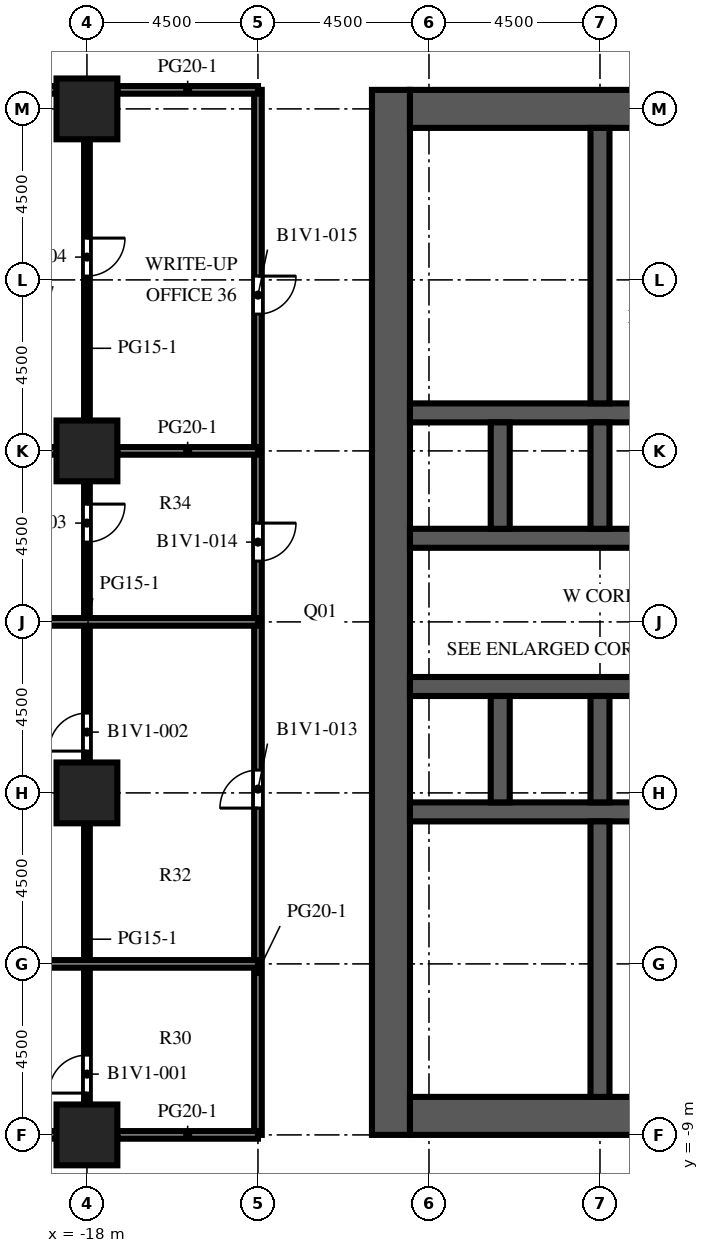
"""IFC4 building model, lengths in metres.
Left out: names, types, materials, properties, quantities, classifications, styles, units other than length and angle.
Written with IfcOpenShell. Run it as: python <this file> out.ifc"""

import sys

from ifc_helpers import new_model, si_unit, direction, frame, frame_2d, origin, origin_2d, place, context, subcontext, project, spatial, rectangle, extrude, element, fill, save


model = new_model("IFC4")
c1 = context("Model", 3, precision=1e-05, world=origin(), true_north=direction((0.0, 1.0)))
c2 = subcontext(c1, "Body", "Model", "MODEL_VIEW")
j1 = project(units=[si_unit("LENGTHUNIT", "METRE"), si_unit("PLANEANGLEUNIT", "RADIAN")], contexts=[c1])
p1 = place(None, origin())
s1 = spatial("IfcSite", under=j1, at=p1, CompositionType="ELEMENT")
p2 = place(p1, origin())
s2 = spatial("IfcBuilding", under=s1, at=p2, CompositionType="ELEMENT")
p3 = place(p2, frame((0.0, 0.0, 27.7)))
s3 = spatial("IfcBuildingStorey", under=s2, at=p3, CompositionType="ELEMENT", Elevation=27.7)
for number, where, z_axis, x_axis in (
    (1, (-18.0, -9.0, 0.0), (0.0, 0.0, 1.0), (1.0, 0.0, 0.0)),
    (2, (-18.0, 0.0, 0.0), (0.0, 0.0, 1.0), (1.0, 0.0, 0.0)),
    (3, (-18.0, 9.0, 0.0), (0.0, 0.0, 1.0), (1.0, 0.0, 0.0)),
    (4, (-18.0, 18.0, 0.0), (0.0, 0.0, 1.0), (1.0, 0.0, 0.0)),
):
    element("IfcColumn", number, at=place(p3, frame(where, z_axis=z_axis, x_axis=x_axis)), inside=s3, PredefinedType="COLUMN", context=c2, shape_type="SweptSolid", body=[
        extrude(rectangle(XDim=1.6, YDim=1.6, at=origin_2d()), origin(), (0.0, 0.0, 1.0), 4.1),
    ])
p4 = place(p3, frame((-10.0, -9.0, 0.0), z_axis=(0.0, 0.0, 1.0), x_axis=(0.0, 1.0, 0.0)))
e5 = element("IfcWall", 5, at=p4, inside=s3, PredefinedType="SHEAR", context=c2, shape_type="SweptSolid", body=[
    extrude(rectangle(XDim=27.5, YDim=1.0, at=frame_2d((13.75, 0.0))), origin(), (0.0, 0.0, 1.0), 4.1),
])
p5 = place(p4, frame((12.55, 0.0, 0.0)))
e6 = element("IfcOpeningElement", 6, at=p5, cuts=e5, PredefinedType="OPENING", context=c2, shape_type="SweptSolid", body=[
    extrude(rectangle(XDim=2.4, YDim=2.4, at=frame_2d((1.2, 1.2))), frame((0.0, 0.51, 0.0), z_axis=(0.0, -1.0, 0.0), x_axis=(1.0, 0.0, 0.0)), (0.0, 0.0, 1.0), 1.02),
])
p6 = place(p4, frame((6.825, 0.0, 0.0)))
e7 = element("IfcOpeningElement", 7, at=p6, cuts=e5, PredefinedType="OPENING", context=c2, shape_type="SweptSolid", body=[
    extrude(rectangle(XDim=1.2, YDim=2.1, at=frame_2d((0.6, 1.05))), frame((0.0, 0.51, 0.0), z_axis=(0.0, -1.0, 0.0), x_axis=(1.0, 0.0, 0.0)), (0.0, 0.0, 1.0), 1.02),
])
p7 = place(p4, frame((19.475, 0.0, 0.0)))
e8 = element("IfcOpeningElement", 8, at=p7, cuts=e5, PredefinedType="OPENING", context=c2, shape_type="SweptSolid", body=[
    extrude(rectangle(XDim=1.2, YDim=2.1, at=frame_2d((0.6, 1.05))), frame((0.0, 0.51, 0.0), z_axis=(0.0, -1.0, 0.0), x_axis=(1.0, 0.0, 0.0)), (0.0, 0.0, 1.0), 1.02),
])
for number, where, z_axis, x_axis in (
    (9, (-9.5, -8.5, 0.0), (0.0, 0.0, 1.0), (1.0, 0.0, 0.0)),
    (10, (-9.5, 18.0, 0.0), (0.0, 0.0, 1.0), (1.0, 0.0, 0.0)),
):
    element("IfcWall", number, at=place(p3, frame(where, z_axis=z_axis, x_axis=x_axis)), inside=s3, PredefinedType="SHEAR", context=c2, shape_type="SweptSolid", body=[
        extrude(rectangle(XDim=10.0, YDim=1.0, at=frame_2d((5.0, 0.0))), origin(), (0.0, 0.0, 1.0), 4.1),
    ])
p8 = place(p3, frame((-9.5, -0.5, 0.0), z_axis=(0.0, 0.0, 1.0), x_axis=(1.0, 0.0, 0.0)))
e11 = element("IfcWall", 11, at=p8, inside=s3, PredefinedType="SHEAR", context=c2, shape_type="SweptSolid", body=[
    extrude(rectangle(XDim=10.0, YDim=0.5, at=frame_2d((5.0, 0.0))), origin(), (0.0, 0.0, 1.0), 4.1),
])
p9 = place(p3, frame((-9.5, 2.8, 0.0), z_axis=(0.0, 0.0, 1.0), x_axis=(1.0, 0.0, 0.0)))
e12 = element("IfcWall", 12, at=p9, inside=s3, PredefinedType="SHEAR", context=c2, shape_type="SweptSolid", body=[
    extrude(rectangle(XDim=10.0, YDim=0.5, at=frame_2d((5.0, 0.0))), origin(), (0.0, 0.0, 1.0), 4.1),
])
p10 = place(p9, frame((0.512, 0.0, 0.0)))
e13 = element("IfcOpeningElement", 13, at=p10, cuts=e12, PredefinedType="OPENING", context=c2, shape_type="SweptSolid", body=[
    extrude(rectangle(XDim=1.1, YDim=2.1, at=frame_2d((0.55, 1.05))), frame((0.0, 0.26, 0.0), z_axis=(0.0, -1.0, 0.0), x_axis=(1.0, 0.0, 0.0)), (0.0, 0.0, 1.0), 0.52),
])
p11 = place(p9, frame((3.137, 0.0, 0.0)))
e14 = element("IfcOpeningElement", 14, at=p11, cuts=e12, PredefinedType="OPENING", context=c2, shape_type="SweptSolid", body=[
    extrude(rectangle(XDim=1.1, YDim=2.1, at=frame_2d((0.55, 1.05))), frame((0.0, 0.26, 0.0), z_axis=(0.0, -1.0, 0.0), x_axis=(1.0, 0.0, 0.0)), (0.0, 0.0, 1.0), 0.52),
])
p12 = place(p9, frame((8.387, 0.0, 0.0)))
e15 = element("IfcOpeningElement", 15, at=p12, cuts=e12, PredefinedType="OPENING", context=c2, shape_type="SweptSolid", body=[
    extrude(rectangle(XDim=1.1, YDim=2.1, at=frame_2d((0.55, 1.05))), frame((0.0, 0.26, 0.0), z_axis=(0.0, -1.0, 0.0), x_axis=(1.0, 0.0, 0.0)), (0.0, 0.0, 1.0), 0.52),
])
p13 = place(p3, frame((-9.5, 6.7, 0.0), z_axis=(0.0, 0.0, 1.0), x_axis=(1.0, 0.0, 0.0)))
e16 = element("IfcWall", 16, at=p13, inside=s3, PredefinedType="SHEAR", context=c2, shape_type="SweptSolid", body=[
    extrude(rectangle(XDim=10.0, YDim=0.5, at=frame_2d((5.0, 0.0))), origin(), (0.0, 0.0, 1.0), 4.1),
])
p14 = place(p13, frame((0.512, 0.0, 0.0)))
e17 = element("IfcOpeningElement", 17, at=p14, cuts=e16, PredefinedType="OPENING", context=c2, shape_type="SweptSolid", body=[
    extrude(rectangle(XDim=1.1, YDim=2.1, at=frame_2d((0.55, 1.05))), frame((0.0, 0.26, 0.0), z_axis=(0.0, -1.0, 0.0), x_axis=(1.0, 0.0, 0.0)), (0.0, 0.0, 1.0), 0.52),
])
p15 = place(p13, frame((3.188, 0.0, 0.0)))
e18 = element("IfcOpeningElement", 18, at=p15, cuts=e16, PredefinedType="OPENING", context=c2, shape_type="SweptSolid", body=[
    extrude(rectangle(XDim=1.0, YDim=2.1, at=frame_2d((0.5, 1.05))), frame((0.0, 0.26, 0.0), z_axis=(0.0, -1.0, 0.0), x_axis=(1.0, 0.0, 0.0)), (0.0, 0.0, 1.0), 0.52),
])
p16 = place(p13, frame((5.812, 0.0, 0.0)))
e19 = element("IfcOpeningElement", 19, at=p16, cuts=e16, PredefinedType="OPENING", context=c2, shape_type="SweptSolid", body=[
    extrude(rectangle(XDim=1.0, YDim=2.1, at=frame_2d((0.5, 1.05))), frame((0.0, 0.26, 0.0), z_axis=(0.0, -1.0, 0.0), x_axis=(1.0, 0.0, 0.0)), (0.0, 0.0, 1.0), 0.52),
])
p17 = place(p13, frame((8.438, 0.0, 0.0)))
e20 = element("IfcOpeningElement", 20, at=p17, cuts=e16, PredefinedType="OPENING", context=c2, shape_type="SweptSolid", body=[
    extrude(rectangle(XDim=1.0, YDim=2.1, at=frame_2d((0.5, 1.05))), frame((0.0, 0.26, 0.0), z_axis=(0.0, -1.0, 0.0), x_axis=(1.0, 0.0, 0.0)), (0.0, 0.0, 1.0), 0.52),
])
p18 = place(p3, frame((-9.5, 10.0, 0.0), z_axis=(0.0, 0.0, 1.0), x_axis=(1.0, 0.0, 0.0)))
e21 = element("IfcWall", 21, at=p18, inside=s3, PredefinedType="SHEAR", context=c2, shape_type="SweptSolid", body=[
    extrude(rectangle(XDim=10.0, YDim=0.5, at=frame_2d((5.0, 0.0))), origin(), (0.0, 0.0, 1.0), 4.1),
])
for number, where, z_axis, x_axis in (
    (22, (-7.125, -0.25, 0.0), (0.0, 0.0, 1.0), (0.0, 1.0, 0.0)),
    (23, (-7.125, 6.95, 0.0), (0.0, 0.0, 1.0), (0.0, 1.0, 0.0)),
    (24, (-4.5, -0.25, 0.0), (0.0, 0.0, 1.0), (0.0, 1.0, 0.0)),
    (25, (-4.5, 6.95, 0.0), (0.0, 0.0, 1.0), (0.0, 1.0, 0.0)),
):
    element("IfcWall", number, at=place(p3, frame(where, z_axis=z_axis, x_axis=x_axis)), inside=s3, PredefinedType="SHEAR", context=c2, shape_type="SweptSolid", body=[
        extrude(rectangle(XDim=2.8, YDim=0.5, at=frame_2d((1.4, 0.0))), origin(), (0.0, 0.0, 1.0), 4.1),
    ])
for number, where, z_axis, x_axis in (
    (26, (-4.5, -8.0, 0.0), (0.0, 0.0, 1.0), (0.0, 1.0, 0.0)),
    (27, (-4.5, 10.25, 0.0), (0.0, 0.0, 1.0), (0.0, 1.0, 0.0)),
):
    element("IfcWall", number, at=place(p3, frame(where, z_axis=z_axis, x_axis=x_axis)), inside=s3, PredefinedType="SHEAR", context=c2, shape_type="SweptSolid", body=[
        extrude(rectangle(XDim=7.25, YDim=0.5, at=frame_2d((3.625, 0.0))), origin(), (0.0, 0.0, 1.0), 4.1),
    ])
p19 = place(p3, frame((-4.25, -5.245, 0.0), z_axis=(0.0, 0.0, 1.0), x_axis=(1.0, 0.0, 0.0)))
e28 = element("IfcWall", 28, at=p19, inside=s3, PredefinedType="PARTITIONING", context=c2, shape_type="SweptSolid", body=[
    extrude(rectangle(XDim=4.75, YDim=0.1, at=frame_2d((2.375, 0.0))), origin(), (0.0, 0.0, 1.0), 3.65),
])
p20 = place(p19, frame((1.875, 0.0, 0.0)))
e29 = element("IfcOpeningElement", 29, at=p20, cuts=e28, PredefinedType="OPENING", context=c2, shape_type="SweptSolid", body=[
    extrude(rectangle(XDim=1.0, YDim=2.1, at=frame_2d((0.5, 1.05))), frame((0.0, 0.06, 0.0), z_axis=(0.0, -1.0, 0.0), x_axis=(1.0, 0.0, 0.0)), (0.0, 0.0, 1.0), 0.12),
])
p21 = place(p3, frame((-4.25, -3.94, 0.0), z_axis=(0.0, 0.0, 1.0), x_axis=(1.0, 0.0, 0.0)))
e30 = element("IfcWall", 30, at=p21, inside=s3, PredefinedType="PARTITIONING", context=c2, shape_type="SweptSolid", body=[
    extrude(rectangle(XDim=1.805, YDim=0.1, at=frame_2d((0.902, 0.0))), origin(), (0.0, 0.0, 1.0), 3.65),
])
p22 = place(p21, frame((0.403, 0.0, 0.0)))
e31 = element("IfcOpeningElement", 31, at=p22, cuts=e30, PredefinedType="OPENING", context=c2, shape_type="SweptSolid", body=[
    extrude(rectangle(XDim=1.0, YDim=2.1, at=frame_2d((0.5, 1.05))), frame((0.0, 0.06, 0.0), z_axis=(0.0, -1.0, 0.0), x_axis=(1.0, 0.0, 0.0)), (0.0, 0.0, 1.0), 0.12),
])
for number, where, z_axis, x_axis in (
    (32, (-4.25, 12.425, 0.0), (0.0, 0.0, 1.0), (1.0, 0.0, 0.0)),
    (33, (-4.25, 14.962, 0.0), (0.0, 0.0, 1.0), (1.0, 0.0, 0.0)),
):
    element("IfcWall", number, at=place(p3, frame(where, z_axis=z_axis, x_axis=x_axis)), inside=s3, PredefinedType="PARTITIONING", context=c2, shape_type="SweptSolid", body=[
        extrude(rectangle(XDim=3.45, YDim=0.1, at=frame_2d((1.725, 0.0))), origin(), (0.0, 0.0, 1.0), 3.65),
    ])
p23 = place(p3, frame((-18.0, -0.8, 0.0), z_axis=(0.0, 0.0, 1.0), x_axis=(0.0, -1.0, 0.0)))
e34 = element("IfcWall", 34, at=p23, inside=s3, PredefinedType="PARTITIONING", context=c2, shape_type="SweptSolid", body=[
    extrude(rectangle(XDim=7.4, YDim=0.15, at=frame_2d((3.7, 0.0))), origin(), (0.0, 0.0, 1.0), 3.65),
])
p24 = place(p23, frame((6.1, 0.0, 0.0)))
e35 = element("IfcOpeningElement", 35, at=p24, cuts=e34, PredefinedType="OPENING", context=c2, shape_type="SweptSolid", body=[
    extrude(rectangle(XDim=1.0, YDim=2.1, at=frame_2d((0.5, 1.05))), frame((0.0, 0.085, 0.0), z_axis=(0.0, -1.0, 0.0), x_axis=(1.0, 0.0, 0.0)), (0.0, 0.0, 1.0), 0.17),
])
p25 = place(p3, frame((-18.0, 0.8, 0.0), z_axis=(0.0, 0.0, 1.0), x_axis=(0.0, 1.0, 0.0)))
e36 = element("IfcWall", 36, at=p25, inside=s3, PredefinedType="PARTITIONING", context=c2, shape_type="SweptSolid", body=[
    extrude(rectangle(XDim=7.4, YDim=0.15, at=frame_2d((3.7, 0.0))), origin(), (0.0, 0.0, 1.0), 3.65),
])
p26 = place(p25, frame((0.3, 0.0, 0.0)))
e37 = element("IfcOpeningElement", 37, at=p26, cuts=e36, PredefinedType="OPENING", context=c2, shape_type="SweptSolid", body=[
    extrude(rectangle(XDim=1.0, YDim=2.1, at=frame_2d((0.5, 1.05))), frame((0.0, 0.085, 0.0), z_axis=(0.0, -1.0, 0.0), x_axis=(1.0, 0.0, 0.0)), (0.0, 0.0, 1.0), 0.17),
])
p27 = place(p25, frame((5.8, 0.0, 0.0)))
e38 = element("IfcOpeningElement", 38, at=p27, cuts=e36, PredefinedType="OPENING", context=c2, shape_type="SweptSolid", body=[
    extrude(rectangle(XDim=1.0, YDim=2.1, at=frame_2d((0.5, 1.05))), frame((0.0, 0.085, 0.0), z_axis=(0.0, -1.0, 0.0), x_axis=(1.0, 0.0, 0.0)), (0.0, 0.0, 1.0), 0.17),
])
p28 = place(p3, frame((-18.0, 9.8, 0.0), z_axis=(0.0, 0.0, 1.0), x_axis=(0.0, 1.0, 0.0)))
e39 = element("IfcWall", 39, at=p28, inside=s3, PredefinedType="PARTITIONING", context=c2, shape_type="SweptSolid", body=[
    extrude(rectangle(XDim=7.4, YDim=0.15, at=frame_2d((3.7, 0.0))), origin(), (0.0, 0.0, 1.0), 3.65),
])
p29 = place(p28, frame((3.8, 0.0, 0.0)))
e40 = element("IfcOpeningElement", 40, at=p29, cuts=e39, PredefinedType="OPENING", context=c2, shape_type="SweptSolid", body=[
    extrude(rectangle(XDim=1.0, YDim=2.1, at=frame_2d((0.5, 1.05))), frame((0.0, 0.085, 0.0), z_axis=(0.0, -1.0, 0.0), x_axis=(1.0, 0.0, 0.0)), (0.0, 0.0, 1.0), 0.17),
])
p30 = place(p3, frame((-13.5, -9.0, 0.0), z_axis=(0.0, 0.0, 1.0), x_axis=(0.0, 1.0, 0.0)))
e41 = element("IfcWall", 41, at=p30, inside=s3, PredefinedType="PARTITIONING", context=c2, shape_type="SweptSolid", body=[
    extrude(rectangle(XDim=27.5, YDim=0.2, at=frame_2d((13.75, 0.0))), origin(), (0.0, 0.0, 1.0), 3.65),
])
p31 = place(p30, frame((8.6, 0.0, 0.0)))
e42 = element("IfcOpeningElement", 42, at=p31, cuts=e41, PredefinedType="OPENING", context=c2, shape_type="SweptSolid", body=[
    extrude(rectangle(XDim=1.0, YDim=2.1, at=frame_2d((0.5, 1.05))), frame((0.0, 0.11, 0.0), z_axis=(0.0, -1.0, 0.0), x_axis=(1.0, 0.0, 0.0)), (0.0, 0.0, 1.0), 0.22),
])
p32 = place(p30, frame((15.1, 0.0, 0.0)))
e43 = element("IfcOpeningElement", 43, at=p32, cuts=e41, PredefinedType="OPENING", context=c2, shape_type="SweptSolid", body=[
    extrude(rectangle(XDim=1.0, YDim=2.1, at=frame_2d((0.5, 1.05))), frame((0.0, 0.11, 0.0), z_axis=(0.0, -1.0, 0.0), x_axis=(1.0, 0.0, 0.0)), (0.0, 0.0, 1.0), 0.22),
])
p33 = place(p30, frame((21.6, 0.0, 0.0)))
e44 = element("IfcOpeningElement", 44, at=p33, cuts=e41, PredefinedType="OPENING", context=c2, shape_type="SweptSolid", body=[
    extrude(rectangle(XDim=1.0, YDim=2.1, at=frame_2d((0.5, 1.05))), frame((0.0, 0.11, 0.0), z_axis=(0.0, -1.0, 0.0), x_axis=(1.0, 0.0, 0.0)), (0.0, 0.0, 1.0), 0.22),
])
p34 = place(p3, frame((-26.3, -9.0, 0.0), z_axis=(0.0, 0.0, 1.0), x_axis=(1.0, 0.0, 0.0)))
e45 = element("IfcWall", 45, at=p34, inside=s3, PredefinedType="PARTITIONING", context=c2, shape_type="SweptSolid", body=[
    extrude(rectangle(XDim=7.5, YDim=0.2, at=frame_2d((3.75, 0.0))), origin(), (0.0, 0.0, 1.0), 3.65),
])
p35 = place(p34, frame((2.9, 0.0, 0.0)))
e46 = element("IfcOpeningElement", 46, at=p35, cuts=e45, PredefinedType="OPENING", context=c2, shape_type="SweptSolid", body=[
    extrude(rectangle(XDim=1.0, YDim=2.1, at=frame_2d((0.5, 1.05))), frame((0.0, 0.11, 0.0), z_axis=(0.0, -1.0, 0.0), x_axis=(1.0, 0.0, 0.0)), (0.0, 0.0, 1.0), 0.22),
])
p36 = place(p3, frame((-17.2, -9.0, 0.0), z_axis=(0.0, 0.0, 1.0), x_axis=(1.0, 0.0, 0.0)))
e47 = element("IfcWall", 47, at=p36, inside=s3, PredefinedType="PARTITIONING", context=c2, shape_type="SweptSolid", body=[
    extrude(rectangle(XDim=3.7, YDim=0.2, at=frame_2d((1.85, 0.0))), origin(), (0.0, 0.0, 1.0), 3.65),
])
for number, where, z_axis, x_axis in (
    (48, (-26.3, -4.5, 0.0), (0.0, 0.0, 1.0), (1.0, 0.0, 0.0)),
    (49, (-26.3, 4.5, 0.0), (0.0, 0.0, 1.0), (1.0, 0.0, 0.0)),
):
    element("IfcWall", number, at=place(p3, frame(where, z_axis=z_axis, x_axis=x_axis)), inside=s3, PredefinedType="PARTITIONING", context=c2, shape_type="SweptSolid", body=[
        extrude(rectangle(XDim=12.8, YDim=0.2, at=frame_2d((6.4, 0.0))), origin(), (0.0, 0.0, 1.0), 3.65),
    ])
p37 = place(p3, frame((-26.3, 9.0, 0.0), z_axis=(0.0, 0.0, 1.0), x_axis=(1.0, 0.0, 0.0)))
e50 = element("IfcWall", 50, at=p37, inside=s3, PredefinedType="PARTITIONING", context=c2, shape_type="SweptSolid", body=[
    extrude(rectangle(XDim=7.5, YDim=0.2, at=frame_2d((3.75, 0.0))), origin(), (0.0, 0.0, 1.0), 3.65),
])
p38 = place(p3, frame((-17.2, 9.0, 0.0), z_axis=(0.0, 0.0, 1.0), x_axis=(1.0, 0.0, 0.0)))
e51 = element("IfcWall", 51, at=p38, inside=s3, PredefinedType="PARTITIONING", context=c2, shape_type="SweptSolid", body=[
    extrude(rectangle(XDim=3.7, YDim=0.2, at=frame_2d((1.85, 0.0))), origin(), (0.0, 0.0, 1.0), 3.65),
])
p39 = place(p3, frame((-26.3, 18.5, 0.0), z_axis=(0.0, 0.0, 1.0), x_axis=(1.0, 0.0, 0.0)))
e52 = element("IfcWall", 52, at=p39, inside=s3, PredefinedType="PARTITIONING", context=c2, shape_type="SweptSolid", body=[
    extrude(rectangle(XDim=7.5, YDim=0.2, at=frame_2d((3.75, 0.0))), origin(), (0.0, 0.0, 1.0), 3.65),
])
p40 = place(p3, frame((-17.2, 18.5, 0.0), z_axis=(0.0, 0.0, 1.0), x_axis=(1.0, 0.0, 0.0)))
e53 = element("IfcWall", 53, at=p40, inside=s3, PredefinedType="PARTITIONING", context=c2, shape_type="SweptSolid", body=[
    extrude(rectangle(XDim=3.7, YDim=0.2, at=frame_2d((1.85, 0.0))), origin(), (0.0, 0.0, 1.0), 3.65),
])
p41 = place(p10, origin())
e54 = element("IfcDoor", 54, at=p41, inside=s3, OperationType="DOUBLE_DOOR_SLIDING", PredefinedType="DOOR", context=c2, shape_type="SweptSolid", body=[
    extrude(rectangle(XDim=1.1, YDim=2.1, at=frame_2d((0.55, 1.05))), frame((0.0, 0.025, 0.0), z_axis=(0.0, -1.0, 0.0), x_axis=(1.0, 0.0, 0.0)), (0.0, 0.0, 1.0), 0.05),
])
fill(e13, e54)
p42 = place(p11, origin())
e55 = element("IfcDoor", 55, at=p42, inside=s3, OperationType="DOUBLE_DOOR_SLIDING", PredefinedType="DOOR", context=c2, shape_type="SweptSolid", body=[
    extrude(rectangle(XDim=1.1, YDim=2.1, at=frame_2d((0.55, 1.05))), frame((0.0, 0.025, 0.0), z_axis=(0.0, -1.0, 0.0), x_axis=(1.0, 0.0, 0.0)), (0.0, 0.0, 1.0), 0.05),
])
fill(e14, e55)
p43 = place(p14, origin())
e56 = element("IfcDoor", 56, at=p43, inside=s3, OperationType="DOUBLE_DOOR_SLIDING", PredefinedType="DOOR", context=c2, shape_type="SweptSolid", body=[
    extrude(rectangle(XDim=1.1, YDim=2.1, at=frame_2d((0.55, 1.05))), frame((0.0, 0.025, 0.0), z_axis=(0.0, -1.0, 0.0), x_axis=(1.0, 0.0, 0.0)), (0.0, 0.0, 1.0), 0.05),
])
fill(e17, e56)
p44 = place(p5, origin())
e57 = element("IfcDoor", 57, at=p44, inside=s3, OperationType="DOUBLE_DOOR_DOUBLE_SWING", PredefinedType="DOOR", context=c2, shape_type="SweptSolid", body=[
    extrude(rectangle(XDim=2.4, YDim=2.4, at=frame_2d((1.2, 1.2))), frame((0.0, 0.025, 0.0), z_axis=(0.0, -1.0, 0.0), x_axis=(1.0, 0.0, 0.0)), (0.0, 0.0, 1.0), 0.05),
])
fill(e6, e57)
p45 = place(p6, origin())
e58 = element("IfcDoor", 58, at=p45, inside=s3, OperationType="SINGLE_SWING_LEFT", PredefinedType="DOOR", context=c2, shape_type="SweptSolid", body=[
    extrude(rectangle(XDim=1.2, YDim=2.1, at=frame_2d((0.6, 1.05))), frame((0.0, 0.025, 0.0), z_axis=(0.0, -1.0, 0.0), x_axis=(1.0, 0.0, 0.0)), (0.0, 0.0, 1.0), 0.05),
])
fill(e7, e58)
p46 = place(p7, origin())
e59 = element("IfcDoor", 59, at=p46, inside=s3, OperationType="SINGLE_SWING_LEFT", PredefinedType="DOOR", context=c2, shape_type="SweptSolid", body=[
    extrude(rectangle(XDim=1.2, YDim=2.1, at=frame_2d((0.6, 1.05))), frame((0.0, 0.025, 0.0), z_axis=(0.0, -1.0, 0.0), x_axis=(1.0, 0.0, 0.0)), (0.0, 0.0, 1.0), 0.05),
])
fill(e8, e59)
p47 = place(p15, origin())
e60 = element("IfcDoor", 60, at=p47, inside=s3, OperationType="SINGLE_SWING_RIGHT", PredefinedType="DOOR", context=c2, shape_type="SweptSolid", body=[
    extrude(rectangle(XDim=1.0, YDim=2.1, at=frame_2d((0.5, 1.05))), frame((0.0, 0.025, 0.0), z_axis=(0.0, -1.0, 0.0), x_axis=(1.0, 0.0, 0.0)), (0.0, 0.0, 1.0), 0.05),
])
fill(e18, e60)
p48 = place(p22, origin())
e61 = element("IfcDoor", 61, at=p48, inside=s3, OperationType="SINGLE_SWING_RIGHT", PredefinedType="DOOR", context=c2, shape_type="SweptSolid", body=[
    extrude(rectangle(XDim=1.0, YDim=2.1, at=frame_2d((0.5, 1.05))), frame((0.0, 0.025, 0.0), z_axis=(0.0, -1.0, 0.0), x_axis=(1.0, 0.0, 0.0)), (0.0, 0.0, 1.0), 0.05),
])
fill(e31, e61)
p49 = place(p24, origin())
e62 = element("IfcDoor", 62, at=p49, inside=s3, OperationType="SINGLE_SWING_RIGHT", PredefinedType="DOOR", context=c2, shape_type="SweptSolid", body=[
    extrude(rectangle(XDim=1.0, YDim=2.1, at=frame_2d((0.5, 1.05))), frame((0.0, 0.025, 0.0), z_axis=(0.0, -1.0, 0.0), x_axis=(1.0, 0.0, 0.0)), (0.0, 0.0, 1.0), 0.05),
])
fill(e35, e62)
p50 = place(p26, origin())
e63 = element("IfcDoor", 63, at=p50, inside=s3, OperationType="SINGLE_SWING_LEFT", PredefinedType="DOOR", context=c2, shape_type="SweptSolid", body=[
    extrude(rectangle(XDim=1.0, YDim=2.1, at=frame_2d((0.5, 1.05))), frame((0.0, 0.025, 0.0), z_axis=(0.0, -1.0, 0.0), x_axis=(1.0, 0.0, 0.0)), (0.0, 0.0, 1.0), 0.05),
])
fill(e37, e63)
p51 = place(p27, origin())
e64 = element("IfcDoor", 64, at=p51, inside=s3, OperationType="SINGLE_SWING_RIGHT", PredefinedType="DOOR", context=c2, shape_type="SweptSolid", body=[
    extrude(rectangle(XDim=1.0, YDim=2.1, at=frame_2d((0.5, 1.05))), frame((0.0, 0.025, 0.0), z_axis=(0.0, -1.0, 0.0), x_axis=(1.0, 0.0, 0.0)), (0.0, 0.0, 1.0), 0.05),
])
fill(e38, e64)
p52 = place(p29, origin())
e65 = element("IfcDoor", 65, at=p52, inside=s3, OperationType="SINGLE_SWING_RIGHT", PredefinedType="DOOR", context=c2, shape_type="SweptSolid", body=[
    extrude(rectangle(XDim=1.0, YDim=2.1, at=frame_2d((0.5, 1.05))), frame((0.0, 0.025, 0.0), z_axis=(0.0, -1.0, 0.0), x_axis=(1.0, 0.0, 0.0)), (0.0, 0.0, 1.0), 0.05),
])
fill(e40, e65)
p53 = place(p31, origin())
e66 = element("IfcDoor", 66, at=p53, inside=s3, OperationType="SINGLE_SWING_LEFT", PredefinedType="DOOR", context=c2, shape_type="SweptSolid", body=[
    extrude(rectangle(XDim=1.0, YDim=2.1, at=frame_2d((0.5, 1.05))), frame((0.0, 0.025, 0.0), z_axis=(0.0, -1.0, 0.0), x_axis=(1.0, 0.0, 0.0)), (0.0, 0.0, 1.0), 0.05),
])
fill(e42, e66)
p54 = place(p32, origin())
e67 = element("IfcDoor", 67, at=p54, inside=s3, OperationType="SINGLE_SWING_RIGHT", PredefinedType="DOOR", context=c2, shape_type="SweptSolid", body=[
    extrude(rectangle(XDim=1.0, YDim=2.1, at=frame_2d((0.5, 1.05))), frame((0.0, 0.025, 0.0), z_axis=(0.0, -1.0, 0.0), x_axis=(1.0, 0.0, 0.0)), (0.0, 0.0, 1.0), 0.05),
])
fill(e43, e67)
p55 = place(p33, origin())
e68 = element("IfcDoor", 68, at=p55, inside=s3, OperationType="SINGLE_SWING_RIGHT", PredefinedType="DOOR", context=c2, shape_type="SweptSolid", body=[
    extrude(rectangle(XDim=1.0, YDim=2.1, at=frame_2d((0.5, 1.05))), frame((0.0, 0.025, 0.0), z_axis=(0.0, -1.0, 0.0), x_axis=(1.0, 0.0, 0.0)), (0.0, 0.0, 1.0), 0.05),
])
fill(e44, e68)
save(model, sys.argv[1])
